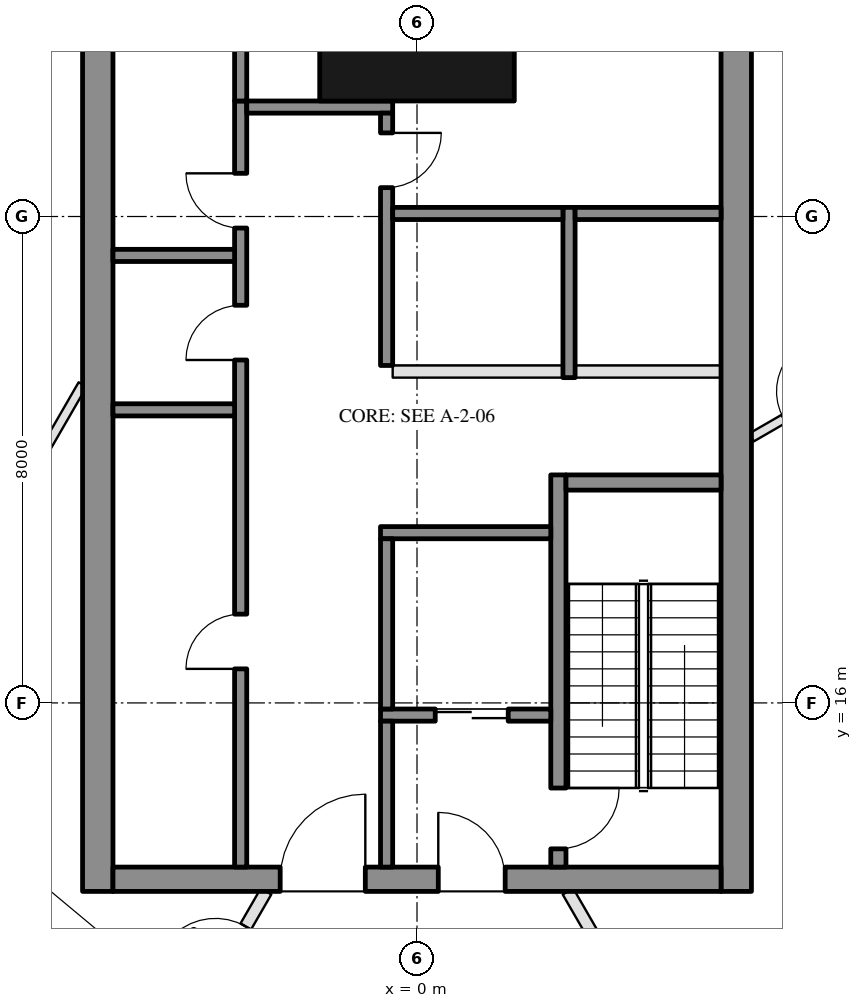
"""IFC4 building model, lengths in metres.
Left out: names, types, materials, properties, quantities, classifications, styles, units other than length and angle.
Written with IfcOpenShell. Run it as: python <this file> out.ifc"""

import sys

from ifc_helpers import new_model, si_unit, direction, frame, frame_2d, origin, origin_2d, place, context, subcontext, project, spatial, rectangle, hollow_rectangle, extrude, element, fill, save


model = new_model("IFC4")
c1 = context("Model", 3, precision=1e-05, world=origin(), true_north=direction((0.0, 1.0)))
c2 = subcontext(c1, "Body", "Model", "MODEL_VIEW")
j1 = project(units=[si_unit("LENGTHUNIT", "METRE"), si_unit("PLANEANGLEUNIT", "RADIAN")], contexts=[c1])
p1 = place(None, origin())
s1 = spatial("IfcSite", under=j1, at=p1, CompositionType="ELEMENT")
p2 = place(p1, origin())
s2 = spatial("IfcBuilding", under=s1, at=p2, CompositionType="ELEMENT")
p3 = place(p2, frame((0.0, 0.0, 33.0)))
s3 = spatial("IfcBuildingStorey", under=s2, at=p3, CompositionType="ELEMENT", Elevation=33.0)
p4 = place(p3, frame((0.0, 27.2, 0.0), z_axis=(0.0, 0.0, 1.0), x_axis=(1.0, 0.0, 0.0)))
e1 = element("IfcColumn", 1, at=p4, inside=s3, PredefinedType="COLUMN", context=c2, shape_type="SweptSolid", body=[
    extrude(hollow_rectangle(XDim=3.2, YDim=2.6, WallThickness=0.08, at=origin_2d()), origin(), (0.0, 0.0, 1.0), 4.5),
])
for number, where, z_axis, x_axis in (
    (2, (5.25, 12.9, 0.0), (0.0, 0.0, 1.0), (0.0, 1.0, 0.0)),
    (3, (-5.25, 12.9, 0.0), (0.0, 0.0, 1.0), (0.0, 1.0, 0.0)),
):
    element("IfcWall", number, at=place(p3, frame(where, z_axis=z_axis, x_axis=x_axis)), inside=s3, PredefinedType="SHEAR", context=c2, shape_type="SweptSolid", body=[
        extrude(rectangle(XDim=14.91, YDim=0.5, at=frame_2d((7.455, 0.0))), origin(), (0.0, 0.0, 1.0), 4.2),
    ])
p5 = place(p3, frame((5.0, 13.1, 0.0), z_axis=(0.0, 0.0, 1.0), x_axis=(-1.0, 0.0, 0.0)))
e4 = element("IfcWall", 4, at=p5, inside=s3, PredefinedType="SHEAR", context=c2, shape_type="SweptSolid", body=[
    extrude(rectangle(XDim=10.0, YDim=0.4, at=frame_2d((5.0, 0.0))), origin(), (0.0, 0.0, 1.0), 4.2),
])
p6 = place(p5, frame((3.55, 0.0, 0.0)))
e5 = element("IfcOpeningElement", 5, at=p6, cuts=e4, PredefinedType="OPENING", context=c2, shape_type="SweptSolid", body=[
    extrude(rectangle(XDim=1.1, YDim=2.1, at=frame_2d((0.55, 1.05))), frame((0.0, 0.21, 0.0), z_axis=(0.0, -1.0, 0.0), x_axis=(1.0, 0.0, 0.0)), (0.0, 0.0, 1.0), 0.42),
])
p7 = place(p5, frame((5.85, 0.0, 0.0)))
e6 = element("IfcOpeningElement", 6, at=p7, cuts=e4, PredefinedType="OPENING", context=c2, shape_type="SweptSolid", body=[
    extrude(rectangle(XDim=1.4, YDim=2.1, at=frame_2d((0.7, 1.05))), frame((0.0, 0.21, 0.0), z_axis=(0.0, -1.0, 0.0), x_axis=(1.0, 0.0, 0.0)), (0.0, 0.0, 1.0), 0.42),
])
p8 = place(p3, frame((2.325, 13.3, 0.0), z_axis=(0.0, 0.0, 1.0), x_axis=(0.0, 1.0, 0.0)))
e7 = element("IfcWall", 7, at=p8, inside=s3, PredefinedType="SHEAR", context=c2, shape_type="SweptSolid", body=[
    extrude(rectangle(XDim=6.45, YDim=0.25, at=frame_2d((3.225, 0.0))), origin(), (0.0, 0.0, 1.0), 4.2),
])
p9 = place(p8, frame((0.3, 0.0, 0.0)))
e8 = element("IfcOpeningElement", 8, at=p9, cuts=e7, PredefinedType="OPENING", context=c2, shape_type="SweptSolid", body=[
    extrude(rectangle(XDim=1.0, YDim=2.1, at=frame_2d((0.5, 1.05))), frame((0.0, 0.135, 0.0), z_axis=(0.0, -1.0, 0.0), x_axis=(1.0, 0.0, 0.0)), (0.0, 0.0, 1.0), 0.27),
])
p10 = place(p3, frame((5.0, 19.625, 0.0), z_axis=(0.0, 0.0, 1.0), x_axis=(-1.0, 0.0, 0.0)))
e9 = element("IfcWall", 9, at=p10, inside=s3, PredefinedType="SHEAR", context=c2, shape_type="SweptSolid", body=[
    extrude(rectangle(XDim=2.55, YDim=0.25, at=frame_2d((1.275, 0.0))), origin(), (0.0, 0.0, 1.0), 4.2),
])
p11 = place(p3, frame((2.2, 18.8, 0.0), z_axis=(0.0, 0.0, 1.0), x_axis=(-1.0, 0.0, 0.0)))
e10 = element("IfcWall", 10, at=p11, inside=s3, PredefinedType="SHEAR", context=c2, shape_type="SweptSolid", body=[
    extrude(rectangle(XDim=2.8, YDim=0.2, at=frame_2d((1.4, 0.0))), origin(), (0.0, 0.0, 1.0), 4.2),
])
p12 = place(p3, frame((2.2, 15.8, 0.0), z_axis=(0.0, 0.0, 1.0), x_axis=(-1.0, 0.0, 0.0)))
e11 = element("IfcWall", 11, at=p12, inside=s3, PredefinedType="SHEAR", context=c2, shape_type="SweptSolid", body=[
    extrude(rectangle(XDim=2.8, YDim=0.2, at=frame_2d((1.4, 0.0))), origin(), (0.0, 0.0, 1.0), 4.2),
])
p13 = place(p12, frame((0.7, 0.0, 0.0)))
e12 = element("IfcOpeningElement", 12, at=p13, cuts=e11, PredefinedType="OPENING", context=c2, shape_type="SweptSolid", body=[
    extrude(rectangle(XDim=1.2, YDim=2.1, at=frame_2d((0.6, 1.05))), frame((0.0, 0.11, 0.0), z_axis=(0.0, -1.0, 0.0), x_axis=(1.0, 0.0, 0.0)), (0.0, 0.0, 1.0), 0.22),
])
p14 = place(p3, frame((-0.5, 15.9, 0.0), z_axis=(0.0, 0.0, 1.0), x_axis=(0.0, 1.0, 0.0)))
e13 = element("IfcWall", 13, at=p14, inside=s3, PredefinedType="SHEAR", context=c2, shape_type="SweptSolid", body=[
    extrude(rectangle(XDim=2.8, YDim=0.2, at=frame_2d((1.4, 0.0))), origin(), (0.0, 0.0, 1.0), 4.2),
])
p15 = place(p3, frame((-0.5, 13.3, 0.0), z_axis=(0.0, 0.0, 1.0), x_axis=(0.0, 1.0, 0.0)))
e14 = element("IfcWall", 14, at=p15, inside=s3, PredefinedType="SHEAR", context=c2, shape_type="SweptSolid", body=[
    extrude(rectangle(XDim=2.4, YDim=0.2, at=frame_2d((1.2, 0.0))), origin(), (0.0, 0.0, 1.0), 4.2),
])
p16 = place(p3, frame((-2.9, 13.3, 0.0), z_axis=(0.0, 0.0, 1.0), x_axis=(0.0, 1.0, 0.0)))
e15 = element("IfcWall", 15, at=p16, inside=s3, PredefinedType="SHEAR", context=c2, shape_type="SweptSolid", body=[
    extrude(rectangle(XDim=12.6, YDim=0.2, at=frame_2d((6.3, 0.0))), origin(), (0.0, 0.0, 1.0), 4.2),
])
p17 = place(p16, frame((3.26, 0.0, 0.0)))
e16 = element("IfcOpeningElement", 16, at=p17, cuts=e15, PredefinedType="OPENING", context=c2, shape_type="SweptSolid", body=[
    extrude(rectangle(XDim=0.9, YDim=2.1, at=frame_2d((0.45, 1.05))), frame((0.0, 0.11, 0.0), z_axis=(0.0, -1.0, 0.0), x_axis=(1.0, 0.0, 0.0)), (0.0, 0.0, 1.0), 0.22),
])
p18 = place(p16, frame((8.34, 0.0, 0.0)))
e17 = element("IfcOpeningElement", 17, at=p18, cuts=e15, PredefinedType="OPENING", context=c2, shape_type="SweptSolid", body=[
    extrude(rectangle(XDim=0.9, YDim=2.1, at=frame_2d((0.45, 1.05))), frame((0.0, 0.11, 0.0), z_axis=(0.0, -1.0, 0.0), x_axis=(1.0, 0.0, 0.0)), (0.0, 0.0, 1.0), 0.22),
])
p19 = place(p16, frame((10.51, 0.0, 0.0)))
e18 = element("IfcOpeningElement", 18, at=p19, cuts=e15, PredefinedType="OPENING", context=c2, shape_type="SweptSolid", body=[
    extrude(rectangle(XDim=0.9, YDim=2.1, at=frame_2d((0.45, 1.05))), frame((0.0, 0.11, 0.0), z_axis=(0.0, -1.0, 0.0), x_axis=(1.0, 0.0, 0.0)), (0.0, 0.0, 1.0), 0.22),
])
p20 = place(p3, frame((-0.4, 25.8, 0.0), z_axis=(0.0, 0.0, 1.0), x_axis=(-1.0, 0.0, 0.0)))
e19 = element("IfcWall", 19, at=p20, inside=s3, PredefinedType="SHEAR", context=c2, shape_type="SweptSolid", body=[
    extrude(rectangle(XDim=2.4, YDim=0.2, at=frame_2d((1.2, 0.0))), origin(), (0.0, 0.0, 1.0), 4.2),
])
p21 = place(p3, frame((-0.5, 21.55, 0.0), z_axis=(0.0, 0.0, 1.0), x_axis=(0.0, 1.0, 0.0)))
e20 = element("IfcWall", 20, at=p21, inside=s3, PredefinedType="SHEAR", context=c2, shape_type="SweptSolid", body=[
    extrude(rectangle(XDim=4.15, YDim=0.2, at=frame_2d((2.075, 0.0))), origin(), (0.0, 0.0, 1.0), 4.2),
])
p22 = place(p21, frame((2.925, 0.0, 0.0)))
e21 = element("IfcOpeningElement", 21, at=p22, cuts=e20, PredefinedType="OPENING", context=c2, shape_type="SweptSolid", body=[
    extrude(rectangle(XDim=0.9, YDim=2.1, at=frame_2d((0.45, 1.05))), frame((0.0, 0.11, 0.0), z_axis=(0.0, -1.0, 0.0), x_axis=(1.0, 0.0, 0.0)), (0.0, 0.0, 1.0), 0.22),
])
for number, where, z_axis, x_axis in (
    (22, (-3.0, 20.82, 0.0), (0.0, 0.0, 1.0), (-1.0, 0.0, 0.0)),
    (23, (-3.0, 23.36, 0.0), (0.0, 0.0, 1.0), (-1.0, 0.0, 0.0)),
):
    element("IfcWall", number, at=place(p3, frame(where, z_axis=z_axis, x_axis=x_axis)), inside=s3, PredefinedType="SHEAR", context=c2, shape_type="SweptSolid", body=[
        extrude(rectangle(XDim=2.0, YDim=0.2, at=frame_2d((1.0, 0.0))), origin(), (0.0, 0.0, 1.0), 4.2),
    ])
p23 = place(p3, frame((-2.9, 25.9, 0.0), z_axis=(0.0, 0.0, 1.0), x_axis=(0.0, 1.0, 0.0)))
e24 = element("IfcWall", 24, at=p23, inside=s3, PredefinedType="SHEAR", context=c2, shape_type="SweptSolid", body=[
    extrude(rectangle(XDim=2.2, YDim=0.2, at=frame_2d((1.1, 0.0))), origin(), (0.0, 0.0, 1.0), 4.2),
])
p24 = place(p3, frame((2.5, 21.35, 0.0), z_axis=(0.0, 0.0, 1.0), x_axis=(0.0, 1.0, 0.0)))
e25 = element("IfcWall", 25, at=p24, inside=s3, PredefinedType="SHEAR", context=c2, shape_type="SweptSolid", body=[
    extrude(rectangle(XDim=2.8, YDim=0.2, at=frame_2d((1.4, 0.0))), origin(), (0.0, 0.0, 1.0), 4.2),
])
p25 = place(p3, frame((5.0, 24.05, 0.0), z_axis=(0.0, 0.0, 1.0), x_axis=(-1.0, 0.0, 0.0)))
e26 = element("IfcWall", 26, at=p25, inside=s3, PredefinedType="SHEAR", context=c2, shape_type="SweptSolid", body=[
    extrude(rectangle(XDim=2.4, YDim=0.2, at=frame_2d((1.2, 0.0))), origin(), (0.0, 0.0, 1.0), 4.2),
])
p26 = place(p3, frame((2.4, 24.05, 0.0), z_axis=(0.0, 0.0, 1.0), x_axis=(-1.0, 0.0, 0.0)))
e27 = element("IfcWall", 27, at=p26, inside=s3, PredefinedType="SHEAR", context=c2, shape_type="SweptSolid", body=[
    extrude(rectangle(XDim=2.8, YDim=0.2, at=frame_2d((1.4, 0.0))), origin(), (0.0, 0.0, 1.0), 4.2),
])
p27 = place(p3, frame((5.0, 21.45, 0.0), z_axis=(0.0, 0.0, 1.0), x_axis=(-1.0, 0.0, 0.0)))
e28 = element("IfcWall", 28, at=p27, inside=s3, PredefinedType="PARTITIONING", context=c2, shape_type="SweptSolid", body=[
    extrude(rectangle(XDim=2.4, YDim=0.2, at=frame_2d((1.2, 0.0))), origin(), (0.0, 0.0, 1.0), 4.2),
])
p28 = place(p3, frame((2.4, 21.45, 0.0), z_axis=(0.0, 0.0, 1.0), x_axis=(-1.0, 0.0, 0.0)))
e29 = element("IfcWall", 29, at=p28, inside=s3, PredefinedType="PARTITIONING", context=c2, shape_type="SweptSolid", body=[
    extrude(rectangle(XDim=2.8, YDim=0.2, at=frame_2d((1.4, 0.0))), origin(), (0.0, 0.0, 1.0), 4.2),
])
p29 = place(p3, frame((13.667, 15.281, 0.0), z_axis=(0.0, 0.0, 1.0), x_axis=(-0.866027503583, -0.499996363024, 0.0)))
e30 = element("IfcWall", 30, at=p29, inside=s3, PredefinedType="SOLIDWALL", context=c2, shape_type="SweptSolid", body=[
    extrude(rectangle(XDim=10.776, YDim=0.2, at=frame_2d((5.388, 0.0))), origin(), (0.0, 0.0, 1.0), 4.2),
])
p30 = place(p3, frame((9.423, 22.631, 0.0), z_axis=(0.0, 0.0, 1.0), x_axis=(-0.866012369481, -0.500022575396, 0.0)))
e31 = element("IfcWall", 31, at=p30, inside=s3, PredefinedType="PARTITIONING", context=c2, shape_type="SweptSolid", body=[
    extrude(rectangle(XDim=4.53, YDim=0.15, at=frame_2d((2.265, 0.0))), origin(), (0.0, 0.0, 1.0), 4.2),
])
p31 = place(p30, frame((3.015, 0.0, 0.0)))
e32 = element("IfcOpeningElement", 32, at=p31, cuts=e31, PredefinedType="OPENING", context=c2, shape_type="SweptSolid", body=[
    extrude(rectangle(XDim=0.9, YDim=2.1, at=frame_2d((0.45, 1.05))), frame((0.0, 0.085, 0.0), z_axis=(0.0, -1.0, 0.0), x_axis=(1.0, 0.0, 0.0)), (0.0, 0.0, 1.0), 0.17),
])
p32 = place(p3, frame((12.413, -4.3, 0.0), z_axis=(0.0, 0.0, 1.0), x_axis=(-0.50000478328, 0.866022642139, 0.0)))
e33 = element("IfcWall", 33, at=p32, inside=s3, PredefinedType="PARTITIONING", context=c2, shape_type="SweptSolid", body=[
    extrude(rectangle(XDim=19.861, YDim=0.2, at=frame_2d((9.931, 0.0))), origin(), (0.0, 0.0, 1.0), 3.41),
])
p33 = place(p32, frame((1.642, 0.0, 0.0)))
e34 = element("IfcOpeningElement", 34, at=p33, cuts=e33, PredefinedType="OPENING", context=c2, shape_type="SweptSolid", body=[
    extrude(rectangle(XDim=1.2, YDim=2.1, at=frame_2d((0.6, 1.05))), frame((0.0, 0.11, 0.0), z_axis=(0.0, -1.0, 0.0), x_axis=(1.0, 0.0, 0.0)), (0.0, 0.0, 1.0), 0.22),
])
p34 = place(p32, frame((6.125, 0.0, 0.0)))
e35 = element("IfcOpeningElement", 35, at=p34, cuts=e33, PredefinedType="OPENING", context=c2, shape_type="SweptSolid", body=[
    extrude(rectangle(XDim=1.2, YDim=2.1, at=frame_2d((0.6, 1.05))), frame((0.0, 0.11, 0.0), z_axis=(0.0, -1.0, 0.0), x_axis=(1.0, 0.0, 0.0)), (0.0, 0.0, 1.0), 0.22),
])
p35 = place(p32, frame((9.918, 0.0, 0.0)))
e36 = element("IfcOpeningElement", 36, at=p35, cuts=e33, PredefinedType="OPENING", context=c2, shape_type="SweptSolid", body=[
    extrude(rectangle(XDim=1.0, YDim=2.1, at=frame_2d((0.5, 1.05))), frame((0.0, 0.11, 0.0), z_axis=(0.0, -1.0, 0.0), x_axis=(1.0, 0.0, 0.0)), (0.0, 0.0, 1.0), 0.22),
])
p36 = place(p32, frame((17.34, 0.0, 0.0)))
e37 = element("IfcOpeningElement", 37, at=p36, cuts=e33, PredefinedType="OPENING", context=c2, shape_type="SweptSolid", body=[
    extrude(rectangle(XDim=1.5, YDim=2.1, at=frame_2d((0.75, 1.05))), frame((0.0, 0.11, 0.0), z_axis=(0.0, -1.0, 0.0), x_axis=(1.0, 0.0, 0.0)), (0.0, 0.0, 1.0), 0.22),
])
p37 = place(p32, frame((13.23, 0.0, 0.0)))
e38 = element("IfcOpeningElement", 38, at=p37, cuts=e33, PredefinedType="OPENING", context=c2, shape_type="SweptSolid", body=[
    extrude(rectangle(XDim=1.8, YDim=2.1, at=frame_2d((0.9, 1.05))), frame((0.0, 0.11, 0.0), z_axis=(0.0, -1.0, 0.0), x_axis=(1.0, 0.0, 0.0)), (0.0, 0.0, 1.0), 0.22),
])
p38 = place(p3, frame((-5.5, 21.236, 0.0), z_axis=(0.0, 0.0, 1.0), x_axis=(-0.499999852422, -0.866025488988, 0.0)))
e39 = element("IfcWall", 39, at=p38, inside=s3, PredefinedType="PARTITIONING", context=c2, shape_type="SweptSolid", body=[
    extrude(rectangle(XDim=9.066, YDim=0.15, at=frame_2d((4.533, 0.0))), origin(), (0.0, 0.0, 1.0), 3.51),
])
p39 = place(p38, frame((3.965, 0.0, 0.0)))
e40 = element("IfcOpeningElement", 40, at=p39, cuts=e39, PredefinedType="OPENING", context=c2, shape_type="SweptSolid", body=[
    extrude(rectangle(XDim=1.2, YDim=2.1, at=frame_2d((0.6, 1.05))), frame((0.0, 0.085, 0.0), z_axis=(0.0, -1.0, 0.0), x_axis=(1.0, 0.0, 0.0)), (0.0, 0.0, 1.0), 0.17),
])
p40 = place(p3, frame((-13.617, 15.367, 0.0), z_axis=(0.0, 0.0, 1.0), x_axis=(0.866027503583, -0.499996363024, 0.0)))
e41 = element("IfcWall", 41, at=p40, inside=s3, PredefinedType="PARTITIONING", context=c2, shape_type="SweptSolid", body=[
    extrude(rectangle(XDim=10.776, YDim=0.15, at=frame_2d((5.388, 0.0))), origin(), (0.0, 0.0, 1.0), 4.2),
])
p41 = place(p3, frame((-2.482, 12.9, 0.0), z_axis=(0.0, 0.0, 1.0), x_axis=(-0.50000478328, -0.866022642139, 0.0)))
e42 = element("IfcWall", 42, at=p41, inside=s3, PredefinedType="PARTITIONING", context=c2, shape_type="SweptSolid", body=[
    extrude(rectangle(XDim=19.861, YDim=0.2, at=frame_2d((9.931, 0.0))), origin(), (0.0, 0.0, 1.0), 3.41),
])
p42 = place(p41, frame((13.23, 0.0, 0.0)))
e43 = element("IfcOpeningElement", 43, at=p42, cuts=e42, PredefinedType="OPENING", context=c2, shape_type="SweptSolid", body=[
    extrude(rectangle(XDim=1.8, YDim=2.1, at=frame_2d((0.9, 1.05))), frame((0.0, 0.11, 0.0), z_axis=(0.0, -1.0, 0.0), x_axis=(1.0, 0.0, 0.0)), (0.0, 0.0, 1.0), 0.22),
])
p43 = place(p41, frame((0.667, 0.0, 0.0)))
e44 = element("IfcOpeningElement", 44, at=p43, cuts=e42, PredefinedType="OPENING", context=c2, shape_type="SweptSolid", body=[
    extrude(rectangle(XDim=1.0, YDim=2.1, at=frame_2d((0.5, 1.05))), frame((0.0, 0.11, 0.0), z_axis=(0.0, -1.0, 0.0), x_axis=(1.0, 0.0, 0.0)), (0.0, 0.0, 1.0), 0.22),
])
p44 = place(p41, frame((2.1, 0.0, 0.0)))
e45 = element("IfcOpeningElement", 45, at=p44, cuts=e42, PredefinedType="OPENING", context=c2, shape_type="SweptSolid", body=[
    extrude(rectangle(XDim=1.0, YDim=2.1, at=frame_2d((0.5, 1.05))), frame((0.0, 0.11, 0.0), z_axis=(0.0, -1.0, 0.0), x_axis=(1.0, 0.0, 0.0)), (0.0, 0.0, 1.0), 0.22),
])
p45 = place(p41, frame((17.49, 0.0, 0.0)))
e46 = element("IfcOpeningElement", 46, at=p45, cuts=e42, PredefinedType="OPENING", context=c2, shape_type="SweptSolid", body=[
    extrude(rectangle(XDim=1.2, YDim=2.1, at=frame_2d((0.6, 1.05))), frame((0.0, 0.11, 0.0), z_axis=(0.0, -1.0, 0.0), x_axis=(1.0, 0.0, 0.0)), (0.0, 0.0, 1.0), 0.22),
])
p46 = place(p41, frame((7.168, 0.0, 0.0)))
e47 = element("IfcOpeningElement", 47, at=p46, cuts=e42, PredefinedType="OPENING", context=c2, shape_type="SweptSolid", body=[
    extrude(rectangle(XDim=1.0, YDim=2.1, at=frame_2d((0.5, 1.05))), frame((0.0, 0.11, 0.0), z_axis=(0.0, -1.0, 0.0), x_axis=(1.0, 0.0, 0.0)), (0.0, 0.0, 1.0), 0.22),
])
p47 = place(p13, origin())
e48 = element("IfcDoor", 48, at=p47, inside=s3, OperationType="DOUBLE_DOOR_SLIDING", PredefinedType="DOOR", context=c2, shape_type="SweptSolid", body=[
    extrude(rectangle(XDim=1.2, YDim=2.1, at=frame_2d((0.6, 1.05))), frame((0.0, 0.025, 0.0), z_axis=(0.0, -1.0, 0.0), x_axis=(1.0, 0.0, 0.0)), (0.0, 0.0, 1.0), 0.05),
])
fill(e12, e48)
p48 = place(p17, origin())
e49 = element("IfcDoor", 49, at=p48, inside=s3, OperationType="SINGLE_SWING_LEFT", PredefinedType="DOOR", context=c2, shape_type="SweptSolid", body=[
    extrude(rectangle(XDim=0.9, YDim=2.1, at=frame_2d((0.45, 1.05))), frame((0.0, 0.025, 0.0), z_axis=(0.0, -1.0, 0.0), x_axis=(1.0, 0.0, 0.0)), (0.0, 0.0, 1.0), 0.05),
])
fill(e16, e49)
p49 = place(p18, origin())
e50 = element("IfcDoor", 50, at=p49, inside=s3, OperationType="SINGLE_SWING_LEFT", PredefinedType="DOOR", context=c2, shape_type="SweptSolid", body=[
    extrude(rectangle(XDim=0.9, YDim=2.1, at=frame_2d((0.45, 1.05))), frame((0.0, 0.025, 0.0), z_axis=(0.0, -1.0, 0.0), x_axis=(1.0, 0.0, 0.0)), (0.0, 0.0, 1.0), 0.05),
])
fill(e17, e50)
p50 = place(p19, origin())
e51 = element("IfcDoor", 51, at=p50, inside=s3, OperationType="SINGLE_SWING_RIGHT", PredefinedType="DOOR", context=c2, shape_type="SweptSolid", body=[
    extrude(rectangle(XDim=0.9, YDim=2.1, at=frame_2d((0.45, 1.05))), frame((0.0, 0.025, 0.0), z_axis=(0.0, -1.0, 0.0), x_axis=(1.0, 0.0, 0.0)), (0.0, 0.0, 1.0), 0.05),
])
fill(e18, e51)
p51 = place(p22, frame((0.9, 0.0, 0.0), z_axis=(0.0, 0.0, 1.0), x_axis=(-1.0, 0.0, 0.0)))
e52 = element("IfcDoor", 52, at=p51, inside=s3, OperationType="SINGLE_SWING_LEFT", PredefinedType="DOOR", context=c2, shape_type="SweptSolid", body=[
    extrude(rectangle(XDim=0.9, YDim=2.1, at=frame_2d((0.45, 1.05))), frame((0.0, 0.025, 0.0), z_axis=(0.0, -1.0, 0.0), x_axis=(1.0, 0.0, 0.0)), (0.0, 0.0, 1.0), 0.05),
])
fill(e21, e52)
p52 = place(p6, frame((1.1, 0.0, 0.0), z_axis=(0.0, 0.0, 1.0), x_axis=(-1.0, 0.0, 0.0)))
e53 = element("IfcDoor", 53, at=p52, inside=s3, OperationType="SINGLE_SWING_LEFT", PredefinedType="DOOR", context=c2, shape_type="SweptSolid", body=[
    extrude(rectangle(XDim=1.1, YDim=2.1, at=frame_2d((0.55, 1.05))), frame((0.0, 0.025, 0.0), z_axis=(0.0, -1.0, 0.0), x_axis=(1.0, 0.0, 0.0)), (0.0, 0.0, 1.0), 0.05),
])
fill(e5, e53)
p53 = place(p7, frame((1.4, 0.0, 0.0), z_axis=(0.0, 0.0, 1.0), x_axis=(-1.0, 0.0, 0.0)))
e54 = element("IfcDoor", 54, at=p53, inside=s3, OperationType="DOUBLE_DOOR_SINGLE_SWING", PredefinedType="DOOR", context=c2, shape_type="SweptSolid", body=[
    extrude(rectangle(XDim=1.4, YDim=2.1, at=frame_2d((0.7, 1.05))), frame((0.0, 0.025, 0.0), z_axis=(0.0, -1.0, 0.0), x_axis=(1.0, 0.0, 0.0)), (0.0, 0.0, 1.0), 0.05),
])
fill(e6, e54)
p54 = place(p9, frame((1.0, 0.0, 0.0), z_axis=(0.0, 0.0, 1.0), x_axis=(-1.0, 0.0, 0.0)))
e55 = element("IfcDoor", 55, at=p54, inside=s3, OperationType="SINGLE_SWING_LEFT", PredefinedType="DOOR", context=c2, shape_type="SweptSolid", body=[
    extrude(rectangle(XDim=1.0, YDim=2.1, at=frame_2d((0.5, 1.05))), frame((0.0, 0.025, 0.0), z_axis=(0.0, -1.0, 0.0), x_axis=(1.0, 0.0, 0.0)), (0.0, 0.0, 1.0), 0.05),
])
fill(e8, e55)
p55 = place(p43, frame((1.0, 0.0, 0.0), z_axis=(0.0, 0.0, 1.0), x_axis=(-1.0, 0.0, 0.0)))
e56 = element("IfcDoor", 56, at=p55, inside=s3, OperationType="SINGLE_SWING_LEFT", PredefinedType="DOOR", context=c2, shape_type="SweptSolid", body=[
    extrude(rectangle(XDim=1.0, YDim=2.1, at=frame_2d((0.5, 1.05))), frame((0.0, 0.025, 0.0), z_axis=(0.0, -1.0, 0.0), x_axis=(1.0, 0.0, 0.0)), (0.0, 0.0, 1.0), 0.05),
])
fill(e44, e56)
save(model, sys.argv[1])
